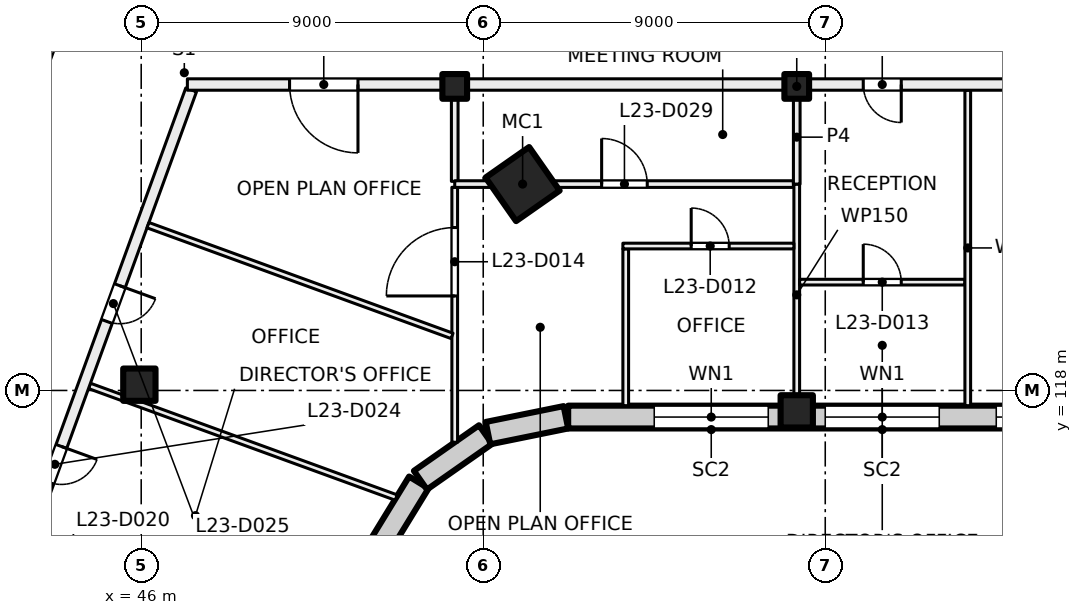
"""IFC4 building model, lengths in metres.
Left out: names, types, materials, properties, quantities, classifications, styles, units other than length and angle.
Written with IfcOpenShell. Run it as: python <this file> out.ifc"""

import sys

from ifc_helpers import new_model, si_unit, direction, frame, frame_2d, origin, origin_2d, place, context, subcontext, project, spatial, rectangle, hollow_rectangle, extrude, element, fill, save


model = new_model("IFC4")
c1 = context("Model", 3, precision=1e-05, world=origin(), true_north=direction((0.0, 1.0)))
c2 = subcontext(c1, "Body", "Model", "MODEL_VIEW")
j1 = project(units=[si_unit("LENGTHUNIT", "METRE"), si_unit("PLANEANGLEUNIT", "RADIAN")], contexts=[c1])
p1 = place(None, origin())
s1 = spatial("IfcSite", under=j1, at=p1, CompositionType="ELEMENT")
p2 = place(p1, origin())
s2 = spatial("IfcBuilding", under=s1, at=p2, CompositionType="ELEMENT")
p3 = place(p2, frame((0.0, 0.0, 101.0)))
s3 = spatial("IfcBuildingStorey", under=s2, at=p3, CompositionType="ELEMENT", Elevation=101.0)
p4 = place(p3, frame((56.036, 123.43, 0.0), z_axis=(0.0, 0.0, 1.0), x_axis=(0.573576436351, -0.819152044289, 0.0)))
e1 = element("IfcColumn", 1, at=p4, inside=s3, PredefinedType="COLUMN", context=c2, shape_type="SweptSolid", body=[
    extrude(hollow_rectangle(XDim=1.4, YDim=1.4, WallThickness=0.04, at=origin_2d()), origin(), (0.0, 0.0, 1.0), 4.0),
])
for number, where, z_axis, x_axis in (
    (2, (54.25, 126.0, 0.0), (0.0, 0.0, 1.0), (1.0, 0.0, 0.0)),
    (3, (63.25, 126.0, 0.0), (0.0, 0.0, 1.0), (1.0, 0.0, 0.0)),
):
    element("IfcColumn", number, at=place(p3, frame(where, z_axis=z_axis, x_axis=x_axis)), inside=s3, PredefinedType="COLUMN", context=c2, shape_type="SweptSolid", body=[
        extrude(rectangle(XDim=0.65, YDim=0.65, at=origin_2d()), origin(), (0.0, 0.0, 1.0), 4.0),
    ])
for number, where, z_axis, x_axis in (
    (4, (45.952, 118.152, 0.0), (0.0, 0.0, 1.0), (1.0, 0.0, 0.0)),
    (5, (63.25, 117.45, 0.0), (0.0, 0.0, 1.0), (1.0, 0.0, 0.0)),
):
    element("IfcColumn", number, at=place(p3, frame(where, z_axis=z_axis, x_axis=x_axis)), inside=s3, PredefinedType="COLUMN", context=c2, shape_type="SweptSolid", body=[
        extrude(rectangle(XDim=0.85, YDim=0.85, at=origin_2d()), origin(), (0.0, 0.0, 1.0), 4.0),
    ])
p5 = place(p3, frame((53.305, 115.578, 0.0), z_axis=(0.0, 0.0, 1.0), x_axis=(-0.522402266438, -0.852699168535, 0.0)))
e6 = element("IfcWall", 6, at=p5, inside=s3, PredefinedType="SOLIDWALL", context=c2, shape_type="SweptSolid", body=[
    extrude(rectangle(XDim=2.042, YDim=0.6, at=frame_2d((1.021, 0.0))), origin(), (0.0, 0.0, 1.0), 3.625),
])
for number, where, z_axis, x_axis in (
    (7, (55.062, 116.839, 0.0), (0.0, 0.0, 1.0), (-0.819, -0.574, 0.0)),
    (8, (57.175, 117.294, 0.0), (0.0, 0.0, 1.0), (-0.98, -0.199, 0.0)),
):
    element("IfcWall", number, at=place(p3, frame(where, z_axis=z_axis, x_axis=x_axis)), inside=s3, PredefinedType="SOLIDWALL", context=c2, shape_type="SweptSolid", body=[
        extrude(rectangle(XDim=2.092, YDim=0.6, at=frame_2d((1.046, 0.0))), origin(), (0.0, 0.0, 1.0), 3.625),
    ])
p6 = place(p3, frame((90.98, 117.3, 0.0), z_axis=(0.0, 0.0, 1.0), x_axis=(-1.0, 0.0, 0.0)))
e9 = element("IfcWall", 9, at=p6, inside=s3, PredefinedType="SOLIDWALL", context=c2, shape_type="SweptSolid", body=[
    extrude(rectangle(XDim=33.745, YDim=0.6, at=frame_2d((16.873, 0.0))), origin(), (0.0, 0.0, 1.0), 3.625),
])
p7 = place(p6, frame((1.48, 0.0, 0.9)))
e10 = element("IfcOpeningElement", 10, at=p7, cuts=e9, PredefinedType="OPENING", context=c2, shape_type="SweptSolid", body=[
    extrude(rectangle(XDim=3.0, YDim=2.4, at=frame_2d((1.5, 1.2))), frame((0.0, 0.31, 0.0), z_axis=(0.0, -1.0, 0.0), x_axis=(1.0, 0.0, 0.0)), (0.0, 0.0, 1.0), 0.62),
])
p8 = place(p6, frame((5.98, 0.0, 0.9)))
e11 = element("IfcOpeningElement", 11, at=p8, cuts=e9, PredefinedType="OPENING", context=c2, shape_type="SweptSolid", body=[
    extrude(rectangle(XDim=3.0, YDim=2.4, at=frame_2d((1.5, 1.2))), frame((0.0, 0.31, 0.0), z_axis=(0.0, -1.0, 0.0), x_axis=(1.0, 0.0, 0.0)), (0.0, 0.0, 1.0), 0.62),
])
p9 = place(p6, frame((10.48, 0.0, 0.9)))
e12 = element("IfcOpeningElement", 12, at=p9, cuts=e9, PredefinedType="OPENING", context=c2, shape_type="SweptSolid", body=[
    extrude(rectangle(XDim=3.0, YDim=2.4, at=frame_2d((1.5, 1.2))), frame((0.0, 0.31, 0.0), z_axis=(0.0, -1.0, 0.0), x_axis=(1.0, 0.0, 0.0)), (0.0, 0.0, 1.0), 0.62),
])
p10 = place(p6, frame((14.98, 0.0, 0.9)))
e13 = element("IfcOpeningElement", 13, at=p10, cuts=e9, PredefinedType="OPENING", context=c2, shape_type="SweptSolid", body=[
    extrude(rectangle(XDim=3.0, YDim=2.4, at=frame_2d((1.5, 1.2))), frame((0.0, 0.31, 0.0), z_axis=(0.0, -1.0, 0.0), x_axis=(1.0, 0.0, 0.0)), (0.0, 0.0, 1.0), 0.62),
])
p11 = place(p6, frame((19.48, 0.0, 0.9)))
e14 = element("IfcOpeningElement", 14, at=p11, cuts=e9, PredefinedType="OPENING", context=c2, shape_type="SweptSolid", body=[
    extrude(rectangle(XDim=3.0, YDim=2.4, at=frame_2d((1.5, 1.2))), frame((0.0, 0.31, 0.0), z_axis=(0.0, -1.0, 0.0), x_axis=(1.0, 0.0, 0.0)), (0.0, 0.0, 1.0), 0.62),
])
p12 = place(p6, frame((23.98, 0.0, 0.9)))
e15 = element("IfcOpeningElement", 15, at=p12, cuts=e9, PredefinedType="OPENING", context=c2, shape_type="SweptSolid", body=[
    extrude(rectangle(XDim=3.0, YDim=2.4, at=frame_2d((1.5, 1.2))), frame((0.0, 0.31, 0.0), z_axis=(0.0, -1.0, 0.0), x_axis=(1.0, 0.0, 0.0)), (0.0, 0.0, 1.0), 0.62),
])
p13 = place(p6, frame((28.48, 0.0, 0.9)))
e16 = element("IfcOpeningElement", 16, at=p13, cuts=e9, PredefinedType="OPENING", context=c2, shape_type="SweptSolid", body=[
    extrude(rectangle(XDim=3.0, YDim=2.4, at=frame_2d((1.5, 1.2))), frame((0.0, 0.31, 0.0), z_axis=(0.0, -1.0, 0.0), x_axis=(1.0, 0.0, 0.0)), (0.0, 0.0, 1.0), 0.62),
])
p14 = place(p3, frame((32.881, 97.657, 0.0), z_axis=(0.0, 0.0, 1.0), x_axis=(0.342017360004, 0.939693633828, 0.0)))
e17 = element("IfcWall", 17, at=p14, inside=s3, PredefinedType="PARTITIONING", context=c2, shape_type="SweptSolid", body=[
    extrude(rectangle(XDim=34.516, YDim=0.3, at=frame_2d((17.258, 0.0))), origin(), (0.0, 0.0, 1.0), 3.625),
])
p15 = place(p14, frame((7.475, 0.0, 0.0)))
e18 = element("IfcOpeningElement", 18, at=p15, cuts=e17, PredefinedType="OPENING", context=c2, shape_type="SweptSolid", body=[
    extrude(rectangle(XDim=1.8, YDim=2.1, at=frame_2d((0.9, 1.05))), frame((0.0, 0.16, 0.0), z_axis=(0.0, -1.0, 0.0), x_axis=(1.0, 0.0, 0.0)), (0.0, 0.0, 1.0), 0.32),
])
p16 = place(p14, frame((25.0, 0.0, 0.0)))
e19 = element("IfcOpeningElement", 19, at=p16, cuts=e17, PredefinedType="OPENING", context=c2, shape_type="SweptSolid", body=[
    extrude(rectangle(XDim=1.0, YDim=2.1, at=frame_2d((0.5, 1.05))), frame((0.0, 0.16, 0.0), z_axis=(0.0, -1.0, 0.0), x_axis=(1.0, 0.0, 0.0)), (0.0, 0.0, 1.0), 0.32),
])
p17 = place(p14, frame((29.779, 0.0, 0.0)))
e20 = element("IfcOpeningElement", 20, at=p17, cuts=e17, PredefinedType="OPENING", context=c2, shape_type="SweptSolid", body=[
    extrude(rectangle(XDim=1.8, YDim=2.1, at=frame_2d((0.9, 1.05))), frame((0.0, 0.16, 0.0), z_axis=(0.0, -1.0, 0.0), x_axis=(1.0, 0.0, 0.0)), (0.0, 0.0, 1.0), 0.32),
])
p18 = place(p3, frame((44.639, 118.12, 0.0), z_axis=(0.0, 0.0, 1.0), x_axis=(0.939669707102, -0.342083091593, 0.0)))
e21 = element("IfcWall", 21, at=p18, inside=s3, PredefinedType="PARTITIONING", context=c2, shape_type="SweptSolid", body=[
    extrude(rectangle(XDim=8.589, YDim=0.15, at=frame_2d((4.295, 0.0))), origin(), (0.0, 0.0, 1.0), 3.625),
])
p19 = place(p3, frame((47.314, 125.909, 0.0), z_axis=(0.0, 0.0, 1.0), x_axis=(-0.342010770371, -0.939696032209, 0.0)))
e22 = element("IfcWall", 22, at=p19, inside=s3, PredefinedType="PARTITIONING", context=c2, shape_type="SweptSolid", body=[
    extrude(rectangle(XDim=31.485, YDim=0.3, at=frame_2d((15.742, 0.0))), origin(), (0.0, 0.0, 1.0), 3.625),
])
p20 = place(p19, frame((26.11, 0.0, 0.0)))
e23 = element("IfcOpeningElement", 23, at=p20, cuts=e22, PredefinedType="OPENING", context=c2, shape_type="SweptSolid", body=[
    extrude(rectangle(XDim=1.0, YDim=2.1, at=frame_2d((0.5, 1.05))), frame((0.0, 0.16, 0.0), z_axis=(0.0, -1.0, 0.0), x_axis=(1.0, 0.0, 0.0)), (0.0, 0.0, 1.0), 0.32),
])
p21 = place(p19, frame((15.485, 0.0, 0.0)))
e24 = element("IfcOpeningElement", 24, at=p21, cuts=e22, PredefinedType="OPENING", context=c2, shape_type="SweptSolid", body=[
    extrude(rectangle(XDim=1.0, YDim=2.1, at=frame_2d((0.5, 1.05))), frame((0.0, 0.16, 0.0), z_axis=(0.0, -1.0, 0.0), x_axis=(1.0, 0.0, 0.0)), (0.0, 0.0, 1.0), 0.32),
])
p22 = place(p19, frame((9.985, 0.0, 0.0)))
e25 = element("IfcOpeningElement", 25, at=p22, cuts=e22, PredefinedType="OPENING", context=c2, shape_type="SweptSolid", body=[
    extrude(rectangle(XDim=1.0, YDim=2.1, at=frame_2d((0.5, 1.05))), frame((0.0, 0.16, 0.0), z_axis=(0.0, -1.0, 0.0), x_axis=(1.0, 0.0, 0.0)), (0.0, 0.0, 1.0), 0.32),
])
p23 = place(p19, frame((5.484, 0.0, 0.0)))
e26 = element("IfcOpeningElement", 26, at=p23, cuts=e22, PredefinedType="OPENING", context=c2, shape_type="SweptSolid", body=[
    extrude(rectangle(XDim=1.0, YDim=2.1, at=frame_2d((0.5, 1.05))), frame((0.0, 0.16, 0.0), z_axis=(0.0, -1.0, 0.0), x_axis=(1.0, 0.0, 0.0)), (0.0, 0.0, 1.0), 0.32),
])
p24 = place(p3, frame((54.25, 116.637, 0.0), z_axis=(0.0, 0.0, 1.0), x_axis=(0.0, 1.0, 0.0)))
e27 = element("IfcWall", 27, at=p24, inside=s3, PredefinedType="PARTITIONING", context=c2, shape_type="SweptSolid", body=[
    extrude(rectangle(XDim=6.709, YDim=0.15, at=frame_2d((3.354, 0.0))), origin(), (0.0, 0.0, 1.0), 3.625),
])
p25 = place(p24, frame((3.85, 0.0, 0.0)))
e28 = element("IfcOpeningElement", 28, at=p25, cuts=e27, PredefinedType="OPENING", context=c2, shape_type="SweptSolid", body=[
    extrude(rectangle(XDim=1.8, YDim=2.1, at=frame_2d((0.9, 1.05))), frame((0.0, 0.085, 0.0), z_axis=(0.0, -1.0, 0.0), x_axis=(1.0, 0.0, 0.0)), (0.0, 0.0, 1.0), 0.17),
])
p26 = place(p3, frame((54.18, 119.436, 0.0), z_axis=(0.0, 0.0, 1.0), x_axis=(-0.939669476286, 0.342083725624, 0.0)))
e29 = element("IfcWall", 29, at=p26, inside=s3, PredefinedType="PARTITIONING", context=c2, shape_type="SweptSolid", body=[
    extrude(rectangle(XDim=8.516, YDim=0.15, at=frame_2d((4.258, 0.0))), origin(), (0.0, 0.0, 1.0), 3.625),
])
p27 = place(p3, frame((54.25, 123.502, 0.0), z_axis=(0.0, 0.0, 1.0), x_axis=(0.0, 1.0, 0.0)))
e30 = element("IfcWall", 30, at=p27, inside=s3, PredefinedType="PARTITIONING", context=c2, shape_type="SweptSolid", body=[
    extrude(rectangle(XDim=2.398, YDim=0.175, at=frame_2d((1.199, 0.0))), origin(), (0.0, 0.0, 1.0), 3.625),
])
p28 = place(p3, frame((54.25, 123.43, 0.0), z_axis=(0.0, 0.0, 1.0), x_axis=(1.0, 0.0, 0.0)))
e31 = element("IfcWall", 31, at=p28, inside=s3, PredefinedType="PARTITIONING", context=c2, shape_type="SweptSolid", body=[
    extrude(rectangle(XDim=8.912, YDim=0.175, at=frame_2d((4.456, 0.0))), origin(), (0.0, 0.0, 1.0), 3.625),
])
p29 = place(p28, frame((3.866, 0.0, 0.0)))
e32 = element("IfcOpeningElement", 32, at=p29, cuts=e31, PredefinedType="OPENING", context=c2, shape_type="SweptSolid", body=[
    extrude(rectangle(XDim=1.2, YDim=2.1, at=frame_2d((0.6, 1.05))), frame((0.0, 0.097, 0.0), z_axis=(0.0, -1.0, 0.0), x_axis=(1.0, 0.0, 0.0)), (0.0, 0.0, 1.0), 0.195),
])
p30 = place(p3, frame((58.75, 117.6, 0.0), z_axis=(0.0, 0.0, 1.0), x_axis=(0.0, 1.0, 0.0)))
e33 = element("IfcWall", 33, at=p30, inside=s3, PredefinedType="PARTITIONING", context=c2, shape_type="SweptSolid", body=[
    extrude(rectangle(XDim=4.125, YDim=0.15, at=frame_2d((2.062, 0.0))), origin(), (0.0, 0.0, 1.0), 3.625),
])
p31 = place(p3, frame((63.25, 117.6, 0.0), z_axis=(0.0, 0.0, 1.0), x_axis=(0.0, 1.0, 0.0)))
e34 = element("IfcWall", 34, at=p31, inside=s3, PredefinedType="PARTITIONING", context=c2, shape_type="SweptSolid", body=[
    extrude(rectangle(XDim=5.83, YDim=0.15, at=frame_2d((2.915, 0.0))), origin(), (0.0, 0.0, 1.0), 3.625),
])
p32 = place(p3, frame((63.325, 120.85, 0.0), z_axis=(0.0, 0.0, 1.0), x_axis=(1.0, 0.0, 0.0)))
e35 = element("IfcWall", 35, at=p32, inside=s3, PredefinedType="PARTITIONING", context=c2, shape_type="SweptSolid", body=[
    extrude(rectangle(XDim=4.35, YDim=0.15, at=frame_2d((2.175, 0.0))), origin(), (0.0, 0.0, 1.0), 3.625),
])
p33 = place(p32, frame((1.675, 0.0, 0.0)))
e36 = element("IfcOpeningElement", 36, at=p33, cuts=e35, PredefinedType="OPENING", context=c2, shape_type="SweptSolid", body=[
    extrude(rectangle(XDim=1.0, YDim=2.1, at=frame_2d((0.5, 1.05))), frame((0.0, 0.085, 0.0), z_axis=(0.0, -1.0, 0.0), x_axis=(1.0, 0.0, 0.0)), (0.0, 0.0, 1.0), 0.17),
])
p34 = place(p3, frame((58.675, 121.8, 0.0), z_axis=(0.0, 0.0, 1.0), x_axis=(1.0, 0.0, 0.0)))
e37 = element("IfcWall", 37, at=p34, inside=s3, PredefinedType="PARTITIONING", context=c2, shape_type="SweptSolid", body=[
    extrude(rectangle(XDim=4.5, YDim=0.15, at=frame_2d((2.25, 0.0))), origin(), (0.0, 0.0, 1.0), 3.625),
])
p35 = place(p34, frame((1.798, 0.0, 0.0)))
e38 = element("IfcOpeningElement", 38, at=p35, cuts=e37, PredefinedType="OPENING", context=c2, shape_type="SweptSolid", body=[
    extrude(rectangle(XDim=1.0, YDim=2.1, at=frame_2d((0.5, 1.05))), frame((0.0, 0.085, 0.0), z_axis=(0.0, -1.0, 0.0), x_axis=(1.0, 0.0, 0.0)), (0.0, 0.0, 1.0), 0.17),
])
p36 = place(p3, frame((63.25, 123.43, 0.0), z_axis=(0.0, 0.0, 1.0), x_axis=(0.0, 1.0, 0.0)))
e39 = element("IfcWall", 39, at=p36, inside=s3, PredefinedType="PARTITIONING", context=c2, shape_type="SweptSolid", body=[
    extrude(rectangle(XDim=2.47, YDim=0.175, at=frame_2d((1.235, 0.0))), origin(), (0.0, 0.0, 1.0), 3.625),
])
p37 = place(p3, frame((67.75, 117.6, 0.0), z_axis=(0.0, 0.0, 1.0), x_axis=(0.0, 1.0, 0.0)))
e40 = element("IfcWall", 40, at=p37, inside=s3, PredefinedType="PARTITIONING", context=c2, shape_type="SweptSolid", body=[
    extrude(rectangle(XDim=8.3, YDim=0.15, at=frame_2d((4.15, 0.0))), origin(), (0.0, 0.0, 1.0), 3.625),
])
p38 = place(p3, frame((91.0, 126.05, 0.0), z_axis=(0.0, 0.0, 1.0), x_axis=(-1.0, 0.0, 0.0)))
e41 = element("IfcWall", 41, at=p38, inside=s3, PredefinedType="PARTITIONING", context=c2, shape_type="SweptSolid", body=[
    extrude(rectangle(XDim=43.785, YDim=0.3, at=frame_2d((21.893, 0.0))), origin(), (0.0, 0.0, 1.0), 3.625),
])
p39 = place(p38, frame((7.85, 0.0, 0.0)))
e42 = element("IfcOpeningElement", 42, at=p39, cuts=e41, PredefinedType="OPENING", context=c2, shape_type="SweptSolid", body=[
    extrude(rectangle(XDim=0.8, YDim=2.1, at=frame_2d((0.4, 1.05))), frame((0.0, 0.16, 0.0), z_axis=(0.0, -1.0, 0.0), x_axis=(1.0, 0.0, 0.0)), (0.0, 0.0, 1.0), 0.32),
])
p40 = place(p38, frame((2.875, 0.0, 0.0)))
e43 = element("IfcOpeningElement", 43, at=p40, cuts=e41, PredefinedType="OPENING", context=c2, shape_type="SweptSolid", body=[
    extrude(rectangle(XDim=1.0, YDim=2.1, at=frame_2d((0.5, 1.05))), frame((0.0, 0.16, 0.0), z_axis=(0.0, -1.0, 0.0), x_axis=(1.0, 0.0, 0.0)), (0.0, 0.0, 1.0), 0.32),
])
p41 = place(p38, frame((15.6, 0.0, 0.0)))
e44 = element("IfcOpeningElement", 44, at=p41, cuts=e41, PredefinedType="OPENING", context=c2, shape_type="SweptSolid", body=[
    extrude(rectangle(XDim=1.8, YDim=2.1, at=frame_2d((0.9, 1.05))), frame((0.0, 0.16, 0.0), z_axis=(0.0, -1.0, 0.0), x_axis=(1.0, 0.0, 0.0)), (0.0, 0.0, 1.0), 0.32),
])
p42 = place(p38, frame((25.0, 0.0, 0.0)))
e45 = element("IfcOpeningElement", 45, at=p42, cuts=e41, PredefinedType="OPENING", context=c2, shape_type="SweptSolid", body=[
    extrude(rectangle(XDim=1.0, YDim=2.1, at=frame_2d((0.5, 1.05))), frame((0.0, 0.16, 0.0), z_axis=(0.0, -1.0, 0.0), x_axis=(1.0, 0.0, 0.0)), (0.0, 0.0, 1.0), 0.32),
])
p43 = place(p38, frame((39.296, 0.0, 0.0)))
e46 = element("IfcOpeningElement", 46, at=p43, cuts=e41, PredefinedType="OPENING", context=c2, shape_type="SweptSolid", body=[
    extrude(rectangle(XDim=1.8, YDim=2.1, at=frame_2d((0.9, 1.05))), frame((0.0, 0.16, 0.0), z_axis=(0.0, -1.0, 0.0), x_axis=(1.0, 0.0, 0.0)), (0.0, 0.0, 1.0), 0.32),
])
p44 = place(p11, origin())
e47 = element("IfcWindow", 47, at=p44, inside=s3, PartitioningType="SINGLE_PANEL", PredefinedType="WINDOW", context=c2, shape_type="SweptSolid", body=[
    extrude(rectangle(XDim=3.0, YDim=2.4, at=frame_2d((1.5, 1.2))), frame((0.0, 0.03, 0.0), z_axis=(0.0, -1.0, 0.0), x_axis=(1.0, 0.0, 0.0)), (0.0, 0.0, 1.0), 0.06),
])
fill(e14, e47)
p45 = place(p12, origin())
e48 = element("IfcWindow", 48, at=p45, inside=s3, PartitioningType="SINGLE_PANEL", PredefinedType="WINDOW", context=c2, shape_type="SweptSolid", body=[
    extrude(rectangle(XDim=3.0, YDim=2.4, at=frame_2d((1.5, 1.2))), frame((0.0, 0.03, 0.0), z_axis=(0.0, -1.0, 0.0), x_axis=(1.0, 0.0, 0.0)), (0.0, 0.0, 1.0), 0.06),
])
fill(e15, e48)
p46 = place(p13, origin())
e49 = element("IfcWindow", 49, at=p46, inside=s3, PartitioningType="SINGLE_PANEL", PredefinedType="WINDOW", context=c2, shape_type="SweptSolid", body=[
    extrude(rectangle(XDim=3.0, YDim=2.4, at=frame_2d((1.5, 1.2))), frame((0.0, 0.03, 0.0), z_axis=(0.0, -1.0, 0.0), x_axis=(1.0, 0.0, 0.0)), (0.0, 0.0, 1.0), 0.06),
])
fill(e16, e49)
p47 = place(p42, origin())
e50 = element("IfcDoor", 50, at=p47, inside=s3, OperationType="SINGLE_SWING_LEFT", PredefinedType="DOOR", context=c2, shape_type="SweptSolid", body=[
    extrude(rectangle(XDim=1.0, YDim=2.1, at=frame_2d((0.5, 1.05))), frame((0.0, 0.025, 0.0), z_axis=(0.0, -1.0, 0.0), x_axis=(1.0, 0.0, 0.0)), (0.0, 0.0, 1.0), 0.05),
])
fill(e45, e50)
p48 = place(p35, origin())
e51 = element("IfcDoor", 51, at=p48, inside=s3, OperationType="SINGLE_SWING_LEFT", PredefinedType="DOOR", context=c2, shape_type="SweptSolid", body=[
    extrude(rectangle(XDim=1.0, YDim=2.1, at=frame_2d((0.5, 1.05))), frame((0.0, 0.025, 0.0), z_axis=(0.0, -1.0, 0.0), x_axis=(1.0, 0.0, 0.0)), (0.0, 0.0, 1.0), 0.05),
])
fill(e38, e51)
p49 = place(p33, origin())
e52 = element("IfcDoor", 52, at=p49, inside=s3, OperationType="SINGLE_SWING_LEFT", PredefinedType="DOOR", context=c2, shape_type="SweptSolid", body=[
    extrude(rectangle(XDim=1.0, YDim=2.1, at=frame_2d((0.5, 1.05))), frame((0.0, 0.025, 0.0), z_axis=(0.0, -1.0, 0.0), x_axis=(1.0, 0.0, 0.0)), (0.0, 0.0, 1.0), 0.05),
])
fill(e36, e52)
p50 = place(p25, origin())
e53 = element("IfcDoor", 53, at=p50, inside=s3, OperationType="DOUBLE_DOOR_SINGLE_SWING", PredefinedType="DOOR", context=c2, shape_type="SweptSolid", body=[
    extrude(rectangle(XDim=1.8, YDim=2.1, at=frame_2d((0.9, 1.05))), frame((0.0, 0.025, 0.0), z_axis=(0.0, -1.0, 0.0), x_axis=(1.0, 0.0, 0.0)), (0.0, 0.0, 1.0), 0.05),
])
fill(e28, e53)
p51 = place(p22, origin())
e54 = element("IfcDoor", 54, at=p51, inside=s3, OperationType="SINGLE_SWING_LEFT", PredefinedType="DOOR", context=c2, shape_type="SweptSolid", body=[
    extrude(rectangle(XDim=1.0, YDim=2.1, at=frame_2d((0.5, 1.05))), frame((0.0, 0.025, 0.0), z_axis=(0.0, -1.0, 0.0), x_axis=(1.0, 0.0, 0.0)), (0.0, 0.0, 1.0), 0.05),
])
fill(e25, e54)
p52 = place(p23, origin())
e55 = element("IfcDoor", 55, at=p52, inside=s3, OperationType="SINGLE_SWING_LEFT", PredefinedType="DOOR", context=c2, shape_type="SweptSolid", body=[
    extrude(rectangle(XDim=1.0, YDim=2.1, at=frame_2d((0.5, 1.05))), frame((0.0, 0.025, 0.0), z_axis=(0.0, -1.0, 0.0), x_axis=(1.0, 0.0, 0.0)), (0.0, 0.0, 1.0), 0.05),
])
fill(e26, e55)
p53 = place(p17, origin())
e56 = element("IfcDoor", 56, at=p53, inside=s3, OperationType="DOUBLE_DOOR_SINGLE_SWING", PredefinedType="DOOR", context=c2, shape_type="SweptSolid", body=[
    extrude(rectangle(XDim=1.8, YDim=2.1, at=frame_2d((0.9, 1.05))), frame((0.0, 0.025, 0.0), z_axis=(0.0, -1.0, 0.0), x_axis=(1.0, 0.0, 0.0)), (0.0, 0.0, 1.0), 0.05),
])
fill(e20, e56)
p54 = place(p43, origin())
e57 = element("IfcDoor", 57, at=p54, inside=s3, OperationType="DOUBLE_DOOR_SINGLE_SWING", PredefinedType="DOOR", context=c2, shape_type="SweptSolid", body=[
    extrude(rectangle(XDim=1.8, YDim=2.1, at=frame_2d((0.9, 1.05))), frame((0.0, 0.025, 0.0), z_axis=(0.0, -1.0, 0.0), x_axis=(1.0, 0.0, 0.0)), (0.0, 0.0, 1.0), 0.05),
])
fill(e46, e57)
p55 = place(p29, origin())
e58 = element("IfcDoor", 58, at=p55, inside=s3, OperationType="DOUBLE_DOOR_SINGLE_SWING", PredefinedType="DOOR", context=c2, shape_type="SweptSolid", body=[
    extrude(rectangle(XDim=1.2, YDim=2.1, at=frame_2d((0.6, 1.05))), frame((0.0, 0.025, 0.0), z_axis=(0.0, -1.0, 0.0), x_axis=(1.0, 0.0, 0.0)), (0.0, 0.0, 1.0), 0.05),
])
fill(e32, e58)
save(model, sys.argv[1])
